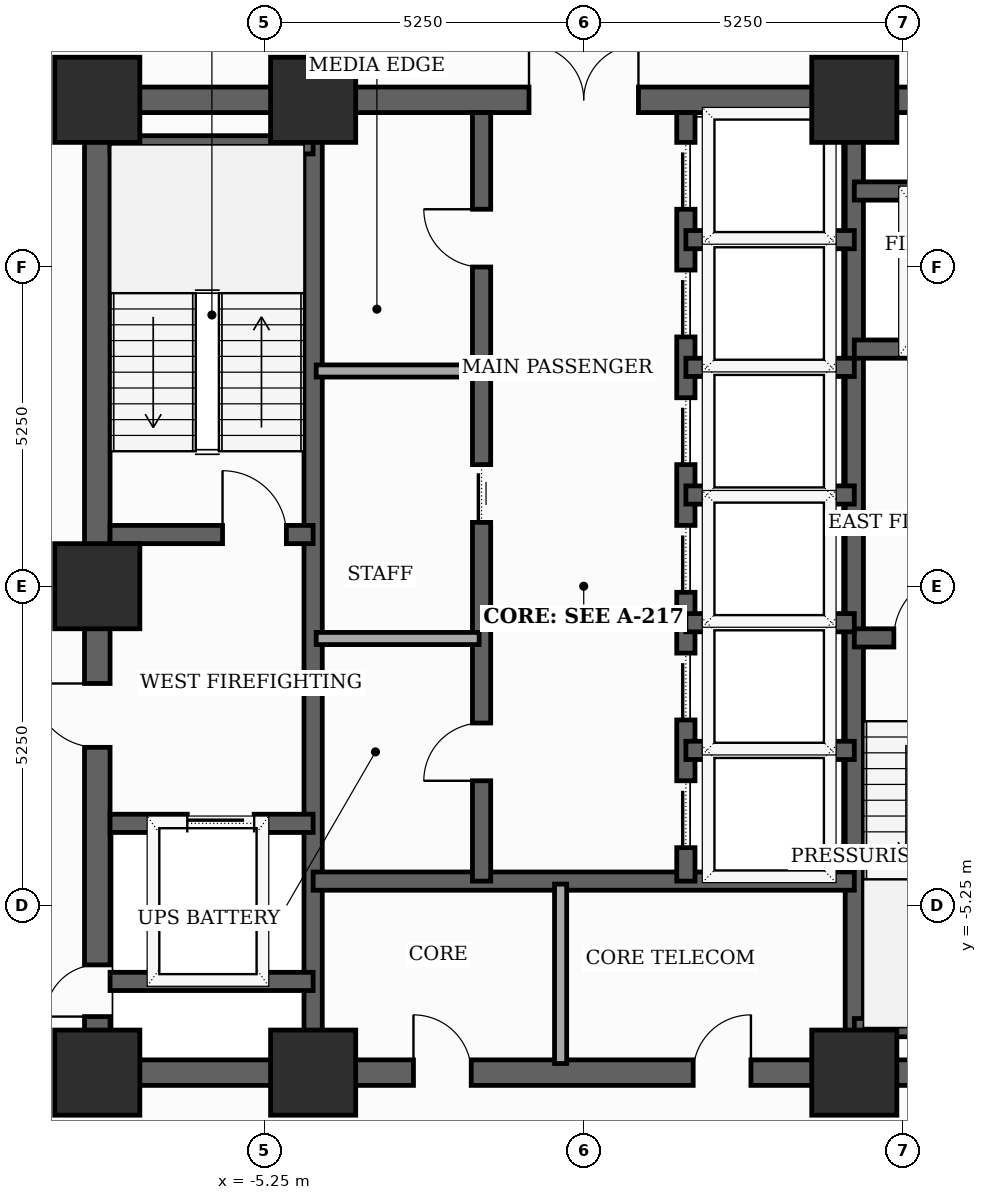
"""IFC4 building model, lengths in metres.
Left out: names, types, materials, properties, quantities, classifications, styles, units other than length and angle.
Written with IfcOpenShell. Run it as: python <this file> out.ifc"""

import sys

from ifc_helpers import new_model, si_unit, direction, frame, frame_2d, origin, origin_2d, place, context, subcontext, project, spatial, rectangle, extrude, element, fill, save


model = new_model("IFC4")
c1 = context("Model", 3, precision=1e-05, world=origin(), true_north=direction((0.0, 1.0)))
c2 = subcontext(c1, "Body", "Model", "MODEL_VIEW")
j1 = project(units=[si_unit("LENGTHUNIT", "METRE"), si_unit("PLANEANGLEUNIT", "RADIAN")], contexts=[c1])
p1 = place(None, origin())
s1 = spatial("IfcSite", under=j1, at=p1, CompositionType="ELEMENT")
p2 = place(p1, origin())
s2 = spatial("IfcBuilding", under=s1, at=p2, CompositionType="ELEMENT")
p3 = place(p2, frame((0.0, 0.0, 131.0)))
s3 = spatial("IfcBuildingStorey", under=s2, at=p3, CompositionType="ELEMENT", Elevation=131.0)
for number, where, z_axis, x_axis in (
    (1, (-8.0, -8.0, 0.0), (0.0, 0.0, 1.0), (1.0, 0.0, 0.0)),
    (2, (-4.45, -8.0, 0.0), (0.0, 0.0, 1.0), (1.0, 0.0, 0.0)),
    (3, (4.45, -8.0, 0.0), (0.0, 0.0, 1.0), (1.0, 0.0, 0.0)),
    (4, (4.45, 8.0, 0.0), (0.0, 0.0, 1.0), (1.0, 0.0, 0.0)),
    (5, (-4.45, 8.0, 0.0), (0.0, 0.0, 1.0), (1.0, 0.0, 0.0)),
    (6, (-8.0, 8.0, 0.0), (0.0, 0.0, 1.0), (1.0, 0.0, 0.0)),
    (7, (-8.0, 0.0, 0.0), (0.0, 0.0, 1.0), (1.0, 0.0, 0.0)),
):
    element("IfcColumn", number, at=place(p3, frame(where, z_axis=z_axis, x_axis=x_axis)), inside=s3, PredefinedType="COLUMN", context=c2, shape_type="SweptSolid", body=[
        extrude(rectangle(XDim=1.4, YDim=1.4, at=origin_2d()), origin(), (0.0, 0.0, 1.0), 3.7),
    ])
p4 = place(p3, frame((-8.0, -8.0, 0.0), z_axis=(0.0, 0.0, 1.0), x_axis=(0.0, 1.0, 0.0)))
e8 = element("IfcWall", 8, at=p4, inside=s3, PredefinedType="SHEAR", context=c2, shape_type="SweptSolid", body=[
    extrude(rectangle(XDim=16.0, YDim=0.42, at=frame_2d((8.0, 0.0))), origin(), (0.0, 0.0, 1.0), 3.5),
])
p5 = place(p4, frame((0.922, 0.0, 0.0)))
e9 = element("IfcOpeningElement", 9, at=p5, cuts=e8, PredefinedType="OPENING", context=c2, shape_type="SweptSolid", body=[
    extrude(rectangle(XDim=0.85, YDim=2.02, at=frame_2d((0.425, 1.01))), frame((0.0, 0.22, 0.0), z_axis=(0.0, -1.0, 0.0), x_axis=(1.0, 0.0, 0.0)), (0.0, 0.0, 1.0), 0.44),
])
p6 = place(p4, frame((5.35, 0.0, 0.0)))
e10 = element("IfcOpeningElement", 10, at=p6, cuts=e8, PredefinedType="OPENING", context=c2, shape_type="SweptSolid", body=[
    extrude(rectangle(XDim=1.05, YDim=2.15, at=frame_2d((0.525, 1.075))), frame((0.0, 0.22, 0.0), z_axis=(0.0, -1.0, 0.0), x_axis=(1.0, 0.0, 0.0)), (0.0, 0.0, 1.0), 0.44),
])
p7 = place(p3, frame((-8.0, -8.0, 0.0), z_axis=(0.0, 0.0, 1.0), x_axis=(1.0, 0.0, 0.0)))
e11 = element("IfcWall", 11, at=p7, inside=s3, PredefinedType="SHEAR", context=c2, shape_type="SweptSolid", body=[
    extrude(rectangle(XDim=16.0, YDim=0.42, at=frame_2d((8.0, 0.0))), origin(), (0.0, 0.0, 1.0), 3.5),
])
p8 = place(p7, frame((5.2, 0.0, 0.0)))
e12 = element("IfcOpeningElement", 12, at=p8, cuts=e11, PredefinedType="OPENING", context=c2, shape_type="SweptSolid", body=[
    extrude(rectangle(XDim=0.95, YDim=2.1, at=frame_2d((0.475, 1.05))), frame((0.0, 0.22, 0.0), z_axis=(0.0, -1.0, 0.0), x_axis=(1.0, 0.0, 0.0)), (0.0, 0.0, 1.0), 0.44),
])
p9 = place(p7, frame((9.8, 0.0, 0.0)))
e13 = element("IfcOpeningElement", 13, at=p9, cuts=e11, PredefinedType="OPENING", context=c2, shape_type="SweptSolid", body=[
    extrude(rectangle(XDim=0.95, YDim=2.1, at=frame_2d((0.475, 1.05))), frame((0.0, 0.22, 0.0), z_axis=(0.0, -1.0, 0.0), x_axis=(1.0, 0.0, 0.0)), (0.0, 0.0, 1.0), 0.44),
])
p10 = place(p3, frame((-8.0, 8.0, 0.0), z_axis=(0.0, 0.0, 1.0), x_axis=(1.0, 0.0, 0.0)))
e14 = element("IfcWall", 14, at=p10, inside=s3, PredefinedType="SHEAR", context=c2, shape_type="SweptSolid", body=[
    extrude(rectangle(XDim=16.0, YDim=0.42, at=frame_2d((8.0, 0.0))), origin(), (0.0, 0.0, 1.0), 3.5),
])
p11 = place(p10, frame((7.1, 0.0, 0.0)))
e15 = element("IfcOpeningElement", 15, at=p11, cuts=e14, PredefinedType="OPENING", context=c2, shape_type="SweptSolid", body=[
    extrude(rectangle(XDim=1.8, YDim=2.15, at=frame_2d((0.9, 1.075))), frame((0.0, 0.22, 0.0), z_axis=(0.0, -1.0, 0.0), x_axis=(1.0, 0.0, 0.0)), (0.0, 0.0, 1.0), 0.44),
])
for number, where, z_axis, x_axis in (
    (16, (-4.45, -7.79, 0.0), (0.0, 0.0, 1.0), (0.0, 1.0, 0.0)),
    (17, (4.45, -7.79, 0.0), (0.0, 0.0, 1.0), (0.0, 1.0, 0.0)),
):
    element("IfcWall", number, at=place(p3, frame(where, z_axis=z_axis, x_axis=x_axis)), inside=s3, PredefinedType="SHEAR", context=c2, shape_type="SweptSolid", body=[
        extrude(rectangle(XDim=15.58, YDim=0.3, at=frame_2d((7.79, 0.0))), origin(), (0.0, 0.0, 1.0), 3.5),
    ])
p12 = place(p3, frame((-7.79, 0.85, 0.0), z_axis=(0.0, 0.0, 1.0), x_axis=(1.0, 0.0, 0.0)))
e18 = element("IfcWall", 18, at=p12, inside=s3, PredefinedType="SHEAR", context=c2, shape_type="SweptSolid", body=[
    extrude(rectangle(XDim=3.34, YDim=0.3, at=frame_2d((1.67, 0.0))), origin(), (0.0, 0.0, 1.0), 3.5),
])
p13 = place(p12, frame((1.85, 0.0, 0.0)))
e19 = element("IfcOpeningElement", 19, at=p13, cuts=e18, PredefinedType="OPENING", context=c2, shape_type="SweptSolid", body=[
    extrude(rectangle(XDim=1.05, YDim=2.15, at=frame_2d((0.525, 1.075))), frame((0.0, 0.16, 0.0), z_axis=(0.0, -1.0, 0.0), x_axis=(1.0, 0.0, 0.0)), (0.0, 0.0, 1.0), 0.32),
])
p14 = place(p3, frame((-7.79, 7.26, 0.0), z_axis=(0.0, 0.0, 1.0), x_axis=(1.0, 0.0, 0.0)))
e20 = element("IfcWall", 20, at=p14, inside=s3, PredefinedType="SHEAR", context=c2, shape_type="SweptSolid", body=[
    extrude(rectangle(XDim=3.34, YDim=0.3, at=frame_2d((1.67, 0.0))), origin(), (0.0, 0.0, 1.0), 3.5),
])
p15 = place(p3, frame((4.45, -0.85, 0.0), z_axis=(0.0, 0.0, 1.0), x_axis=(1.0, 0.0, 0.0)))
e21 = element("IfcWall", 21, at=p15, inside=s3, PredefinedType="SHEAR", context=c2, shape_type="SweptSolid", body=[
    extrude(rectangle(XDim=3.34, YDim=0.3, at=frame_2d((1.67, 0.0))), origin(), (0.0, 0.0, 1.0), 3.5),
])
p16 = place(p15, frame((0.65, 0.0, 0.0)))
e22 = element("IfcOpeningElement", 22, at=p16, cuts=e21, PredefinedType="OPENING", context=c2, shape_type="SweptSolid", body=[
    extrude(rectangle(XDim=1.05, YDim=2.15, at=frame_2d((0.525, 1.075))), frame((0.0, 0.16, 0.0), z_axis=(0.0, -1.0, 0.0), x_axis=(1.0, 0.0, 0.0)), (0.0, 0.0, 1.0), 0.32),
])
p17 = place(p3, frame((4.45, -7.26, 0.0), z_axis=(0.0, 0.0, 1.0), x_axis=(1.0, 0.0, 0.0)))
e23 = element("IfcWall", 23, at=p17, inside=s3, PredefinedType="SHEAR", context=c2, shape_type="SweptSolid", body=[
    extrude(rectangle(XDim=3.55, YDim=0.3, at=frame_2d((1.775, 0.0))), origin(), (0.0, 0.0, 1.0), 3.5),
])
p18 = place(p3, frame((-7.79, -3.9, 0.0), z_axis=(0.0, 0.0, 1.0), x_axis=(1.0, 0.0, 0.0)))
e24 = element("IfcWall", 24, at=p18, inside=s3, PredefinedType="SHEAR", context=c2, shape_type="SweptSolid", body=[
    extrude(rectangle(XDim=3.34, YDim=0.3, at=frame_2d((1.67, 0.0))), origin(), (0.0, 0.0, 1.0), 3.5),
])
p19 = place(p18, frame((1.27, 0.0, 0.0)))
e25 = element("IfcOpeningElement", 25, at=p19, cuts=e24, PredefinedType="OPENING", context=c2, shape_type="SweptSolid", body=[
    extrude(rectangle(XDim=1.1, YDim=2.1, at=frame_2d((0.55, 1.05))), frame((0.0, 0.16, 0.0), z_axis=(0.0, -1.0, 0.0), x_axis=(1.0, 0.0, 0.0)), (0.0, 0.0, 1.0), 0.32),
])
p20 = place(p3, frame((-7.79, -6.5, 0.0), z_axis=(0.0, 0.0, 1.0), x_axis=(1.0, 0.0, 0.0)))
e26 = element("IfcWall", 26, at=p20, inside=s3, PredefinedType="SHEAR", context=c2, shape_type="SweptSolid", body=[
    extrude(rectangle(XDim=3.34, YDim=0.3, at=frame_2d((1.67, 0.0))), origin(), (0.0, 0.0, 1.0), 3.5),
])
p21 = place(p3, frame((4.45, 3.9, 0.0), z_axis=(0.0, 0.0, 1.0), x_axis=(1.0, 0.0, 0.0)))
e27 = element("IfcWall", 27, at=p21, inside=s3, PredefinedType="SHEAR", context=c2, shape_type="SweptSolid", body=[
    extrude(rectangle(XDim=3.34, YDim=0.3, at=frame_2d((1.67, 0.0))), origin(), (0.0, 0.0, 1.0), 3.5),
])
p22 = place(p21, frame((1.18, 0.0, 0.0)))
e28 = element("IfcOpeningElement", 28, at=p22, cuts=e27, PredefinedType="OPENING", context=c2, shape_type="SweptSolid", body=[
    extrude(rectangle(XDim=1.1, YDim=2.1, at=frame_2d((0.55, 1.05))), frame((0.0, 0.16, 0.0), z_axis=(0.0, -1.0, 0.0), x_axis=(1.0, 0.0, 0.0)), (0.0, 0.0, 1.0), 0.32),
])
p23 = place(p3, frame((4.45, 6.5, 0.0), z_axis=(0.0, 0.0, 1.0), x_axis=(1.0, 0.0, 0.0)))
e29 = element("IfcWall", 29, at=p23, inside=s3, PredefinedType="SHEAR", context=c2, shape_type="SweptSolid", body=[
    extrude(rectangle(XDim=3.34, YDim=0.3, at=frame_2d((1.67, 0.0))), origin(), (0.0, 0.0, 1.0), 3.5),
])
p24 = place(p3, frame((-4.45, -4.85, 0.0), z_axis=(0.0, 0.0, 1.0), x_axis=(1.0, 0.0, 0.0)))
e30 = element("IfcWall", 30, at=p24, inside=s3, PredefinedType="SHEAR", context=c2, shape_type="SweptSolid", body=[
    extrude(rectangle(XDim=8.9, YDim=0.3, at=frame_2d((4.45, 0.0))), origin(), (0.0, 0.0, 1.0), 3.5),
])
p25 = place(p3, frame((-1.68, -4.85, 0.0), z_axis=(0.0, 0.0, 1.0), x_axis=(0.0, 1.0, 0.0)))
e31 = element("IfcWall", 31, at=p25, inside=s3, PredefinedType="SHEAR", context=c2, shape_type="SweptSolid", body=[
    extrude(rectangle(XDim=12.64, YDim=0.3, at=frame_2d((6.32, 0.0))), origin(), (0.0, 0.0, 1.0), 3.5),
])
p26 = place(p25, frame((1.65, 0.0, 0.0)))
e32 = element("IfcOpeningElement", 32, at=p26, cuts=e31, PredefinedType="OPENING", context=c2, shape_type="SweptSolid", body=[
    extrude(rectangle(XDim=0.95, YDim=2.1, at=frame_2d((0.475, 1.05))), frame((0.0, 0.16, 0.0), z_axis=(0.0, -1.0, 0.0), x_axis=(1.0, 0.0, 0.0)), (0.0, 0.0, 1.0), 0.32),
])
p27 = place(p25, frame((5.9, 0.0, 0.0)))
e33 = element("IfcOpeningElement", 33, at=p27, cuts=e31, PredefinedType="OPENING", context=c2, shape_type="SweptSolid", body=[
    extrude(rectangle(XDim=0.95, YDim=2.1, at=frame_2d((0.475, 1.05))), frame((0.0, 0.16, 0.0), z_axis=(0.0, -1.0, 0.0), x_axis=(1.0, 0.0, 0.0)), (0.0, 0.0, 1.0), 0.32),
])
p28 = place(p25, frame((10.1, 0.0, 0.0)))
e34 = element("IfcOpeningElement", 34, at=p28, cuts=e31, PredefinedType="OPENING", context=c2, shape_type="SweptSolid", body=[
    extrude(rectangle(XDim=0.95, YDim=2.1, at=frame_2d((0.475, 1.05))), frame((0.0, 0.16, 0.0), z_axis=(0.0, -1.0, 0.0), x_axis=(1.0, 0.0, 0.0)), (0.0, 0.0, 1.0), 0.32),
])
p29 = place(p3, frame((1.68, -4.85, 0.0), z_axis=(0.0, 0.0, 1.0), x_axis=(0.0, 1.0, 0.0)))
e35 = element("IfcWall", 35, at=p29, inside=s3, PredefinedType="SHEAR", context=c2, shape_type="SweptSolid", body=[
    extrude(rectangle(XDim=12.64, YDim=0.3, at=frame_2d((6.32, 0.0))), origin(), (0.0, 0.0, 1.0), 3.5),
])
p30 = place(p29, frame((0.55, 0.0, 0.0)))
e36 = element("IfcOpeningElement", 36, at=p30, cuts=e35, PredefinedType="OPENING", context=c2, shape_type="SweptSolid", body=[
    extrude(rectangle(XDim=1.1, YDim=2.1, at=frame_2d((0.55, 1.05))), frame((0.0, 0.16, 0.0), z_axis=(0.0, -1.0, 0.0), x_axis=(1.0, 0.0, 0.0)), (0.0, 0.0, 1.0), 0.32),
])
p31 = place(p29, frame((2.65, 0.0, 0.0)))
e37 = element("IfcOpeningElement", 37, at=p31, cuts=e35, PredefinedType="OPENING", context=c2, shape_type="SweptSolid", body=[
    extrude(rectangle(XDim=1.1, YDim=2.1, at=frame_2d((0.55, 1.05))), frame((0.0, 0.16, 0.0), z_axis=(0.0, -1.0, 0.0), x_axis=(1.0, 0.0, 0.0)), (0.0, 0.0, 1.0), 0.32),
])
p32 = place(p29, frame((4.75, 0.0, 0.0)))
e38 = element("IfcOpeningElement", 38, at=p32, cuts=e35, PredefinedType="OPENING", context=c2, shape_type="SweptSolid", body=[
    extrude(rectangle(XDim=1.1, YDim=2.1, at=frame_2d((0.55, 1.05))), frame((0.0, 0.16, 0.0), z_axis=(0.0, -1.0, 0.0), x_axis=(1.0, 0.0, 0.0)), (0.0, 0.0, 1.0), 0.32),
])
p33 = place(p29, frame((6.85, 0.0, 0.0)))
e39 = element("IfcOpeningElement", 39, at=p33, cuts=e35, PredefinedType="OPENING", context=c2, shape_type="SweptSolid", body=[
    extrude(rectangle(XDim=1.1, YDim=2.1, at=frame_2d((0.55, 1.05))), frame((0.0, 0.16, 0.0), z_axis=(0.0, -1.0, 0.0), x_axis=(1.0, 0.0, 0.0)), (0.0, 0.0, 1.0), 0.32),
])
p34 = place(p29, frame((8.95, 0.0, 0.0)))
e40 = element("IfcOpeningElement", 40, at=p34, cuts=e35, PredefinedType="OPENING", context=c2, shape_type="SweptSolid", body=[
    extrude(rectangle(XDim=1.1, YDim=2.1, at=frame_2d((0.55, 1.05))), frame((0.0, 0.16, 0.0), z_axis=(0.0, -1.0, 0.0), x_axis=(1.0, 0.0, 0.0)), (0.0, 0.0, 1.0), 0.32),
])
p35 = place(p29, frame((11.05, 0.0, 0.0)))
e41 = element("IfcOpeningElement", 41, at=p35, cuts=e35, PredefinedType="OPENING", context=c2, shape_type="SweptSolid", body=[
    extrude(rectangle(XDim=1.1, YDim=2.1, at=frame_2d((0.55, 1.05))), frame((0.0, 0.16, 0.0), z_axis=(0.0, -1.0, 0.0), x_axis=(1.0, 0.0, 0.0)), (0.0, 0.0, 1.0), 0.32),
])
for number, where, z_axis, x_axis in (
    (42, (1.68, 1.5, 0.0), (0.0, 0.0, 1.0), (1.0, 0.0, 0.0)),
    (43, (1.68, 3.6, 0.0), (0.0, 0.0, 1.0), (1.0, 0.0, 0.0)),
    (44, (1.68, 5.7, 0.0), (0.0, 0.0, 1.0), (1.0, 0.0, 0.0)),
    (45, (1.68, -2.7, 0.0), (0.0, 0.0, 1.0), (1.0, 0.0, 0.0)),
    (46, (1.68, -0.6, 0.0), (0.0, 0.0, 1.0), (1.0, 0.0, 0.0)),
):
    element("IfcWall", number, at=place(p3, frame(where, z_axis=z_axis, x_axis=x_axis)), inside=s3, PredefinedType="SHEAR", context=c2, shape_type="SweptSolid", body=[
        extrude(rectangle(XDim=2.77, YDim=0.3, at=frame_2d((1.385, 0.0))), origin(), (0.0, 0.0, 1.0), 3.5),
    ])
p36 = place(p3, frame((-0.38, -7.85, 0.0), z_axis=(0.0, 0.0, 1.0), x_axis=(0.0, 1.0, 0.0)))
e47 = element("IfcWall", 47, at=p36, inside=s3, PredefinedType="SOLIDWALL", context=c2, shape_type="SweptSolid", body=[
    extrude(rectangle(XDim=2.95, YDim=0.2, at=frame_2d((1.475, 0.0))), origin(), (0.0, 0.0, 1.0), 2.885),
])
for number, where, z_axis, x_axis in (
    (48, (-4.4, -0.86, 0.0), (0.0, 0.0, 1.0), (1.0, 0.0, 0.0)),
    (49, (-4.4, 3.54, 0.0), (0.0, 0.0, 1.0), (1.0, 0.0, 0.0)),
):
    element("IfcWall", number, at=place(p3, frame(where, z_axis=z_axis, x_axis=x_axis)), inside=s3, PredefinedType="SOLIDWALL", context=c2, shape_type="SweptSolid", body=[
        extrude(rectangle(XDim=2.68, YDim=0.2, at=frame_2d((1.34, 0.0))), origin(), (0.0, 0.0, 1.0), 3.5),
    ])
p37 = place(p5, origin())
e50 = element("IfcDoor", 50, at=p37, inside=s3, OperationType="SINGLE_SWING_LEFT", PredefinedType="TRAPDOOR", context=c2, shape_type="SweptSolid", body=[
    extrude(rectangle(XDim=0.85, YDim=2.02, at=frame_2d((0.425, 1.01))), frame((0.0, 0.025, 0.0), z_axis=(0.0, -1.0, 0.0), x_axis=(1.0, 0.0, 0.0)), (0.0, 0.0, 1.0), 0.05),
])
fill(e9, e50)
p38 = place(p6, origin())
e51 = element("IfcDoor", 51, at=p38, inside=s3, OperationType="SINGLE_SWING_RIGHT", PredefinedType="DOOR", context=c2, shape_type="SweptSolid", body=[
    extrude(rectangle(XDim=1.05, YDim=2.15, at=frame_2d((0.525, 1.075))), frame((0.0, 0.025, 0.0), z_axis=(0.0, -1.0, 0.0), x_axis=(1.0, 0.0, 0.0)), (0.0, 0.0, 1.0), 0.05),
])
fill(e10, e51)
p39 = place(p8, origin())
e52 = element("IfcDoor", 52, at=p39, inside=s3, OperationType="SINGLE_SWING_LEFT", PredefinedType="DOOR", context=c2, shape_type="SweptSolid", body=[
    extrude(rectangle(XDim=0.95, YDim=2.1, at=frame_2d((0.475, 1.05))), frame((0.0, 0.025, 0.0), z_axis=(0.0, -1.0, 0.0), x_axis=(1.0, 0.0, 0.0)), (0.0, 0.0, 1.0), 0.05),
])
fill(e12, e52)
p40 = place(p9, origin())
e53 = element("IfcDoor", 53, at=p40, inside=s3, OperationType="SINGLE_SWING_RIGHT", PredefinedType="DOOR", context=c2, shape_type="SweptSolid", body=[
    extrude(rectangle(XDim=0.95, YDim=2.1, at=frame_2d((0.475, 1.05))), frame((0.0, 0.025, 0.0), z_axis=(0.0, -1.0, 0.0), x_axis=(1.0, 0.0, 0.0)), (0.0, 0.0, 1.0), 0.05),
])
fill(e13, e53)
p41 = place(p11, origin())
e54 = element("IfcDoor", 54, at=p41, inside=s3, OperationType="DOUBLE_DOOR_SINGLE_SWING", PredefinedType="DOOR", context=c2, shape_type="SweptSolid", body=[
    extrude(rectangle(XDim=1.8, YDim=2.15, at=frame_2d((0.9, 1.075))), frame((0.0, 0.025, 0.0), z_axis=(0.0, -1.0, 0.0), x_axis=(1.0, 0.0, 0.0)), (0.0, 0.0, 1.0), 0.05),
])
fill(e15, e54)
p42 = place(p13, origin())
e55 = element("IfcDoor", 55, at=p42, inside=s3, OperationType="SINGLE_SWING_LEFT", PredefinedType="DOOR", context=c2, shape_type="SweptSolid", body=[
    extrude(rectangle(XDim=1.05, YDim=2.15, at=frame_2d((0.525, 1.075))), frame((0.0, 0.025, 0.0), z_axis=(0.0, -1.0, 0.0), x_axis=(1.0, 0.0, 0.0)), (0.0, 0.0, 1.0), 0.05),
])
fill(e19, e55)
p43 = place(p16, origin())
e56 = element("IfcDoor", 56, at=p43, inside=s3, OperationType="SINGLE_SWING_RIGHT", PredefinedType="DOOR", context=c2, shape_type="SweptSolid", body=[
    extrude(rectangle(XDim=1.05, YDim=2.15, at=frame_2d((0.525, 1.075))), frame((0.0, 0.025, 0.0), z_axis=(0.0, -1.0, 0.0), x_axis=(1.0, 0.0, 0.0)), (0.0, 0.0, 1.0), 0.05),
])
fill(e22, e56)
p44 = place(p19, origin())
e57 = element("IfcDoor", 57, at=p44, inside=s3, OperationType="SLIDING_TO_LEFT", PredefinedType="DOOR", context=c2, shape_type="SweptSolid", body=[
    extrude(rectangle(XDim=1.1, YDim=2.1, at=frame_2d((0.55, 1.05))), frame((0.0, 0.025, 0.0), z_axis=(0.0, -1.0, 0.0), x_axis=(1.0, 0.0, 0.0)), (0.0, 0.0, 1.0), 0.05),
])
fill(e25, e57)
p45 = place(p26, origin())
e58 = element("IfcDoor", 58, at=p45, inside=s3, OperationType="SINGLE_SWING_LEFT", PredefinedType="DOOR", context=c2, shape_type="SweptSolid", body=[
    extrude(rectangle(XDim=0.95, YDim=2.1, at=frame_2d((0.475, 1.05))), frame((0.0, 0.025, 0.0), z_axis=(0.0, -1.0, 0.0), x_axis=(1.0, 0.0, 0.0)), (0.0, 0.0, 1.0), 0.05),
])
fill(e32, e58)
p46 = place(p27, origin())
e59 = element("IfcDoor", 59, at=p46, inside=s3, OperationType="SLIDING_TO_LEFT", PredefinedType="DOOR", context=c2, shape_type="SweptSolid", body=[
    extrude(rectangle(XDim=0.95, YDim=2.1, at=frame_2d((0.475, 1.05))), frame((0.0, 0.025, 0.0), z_axis=(0.0, -1.0, 0.0), x_axis=(1.0, 0.0, 0.0)), (0.0, 0.0, 1.0), 0.05),
])
fill(e33, e59)
p47 = place(p28, origin())
e60 = element("IfcDoor", 60, at=p47, inside=s3, OperationType="SINGLE_SWING_RIGHT", PredefinedType="DOOR", context=c2, shape_type="SweptSolid", body=[
    extrude(rectangle(XDim=0.95, YDim=2.1, at=frame_2d((0.475, 1.05))), frame((0.0, 0.025, 0.0), z_axis=(0.0, -1.0, 0.0), x_axis=(1.0, 0.0, 0.0)), (0.0, 0.0, 1.0), 0.05),
])
fill(e34, e60)
p48 = place(p30, origin())
e61 = element("IfcDoor", 61, at=p48, inside=s3, OperationType="SLIDING_TO_LEFT", PredefinedType="DOOR", context=c2, shape_type="SweptSolid", body=[
    extrude(rectangle(XDim=1.1, YDim=2.1, at=frame_2d((0.55, 1.05))), frame((0.0, 0.025, 0.0), z_axis=(0.0, -1.0, 0.0), x_axis=(1.0, 0.0, 0.0)), (0.0, 0.0, 1.0), 0.05),
])
fill(e36, e61)
p49 = place(p31, origin())
e62 = element("IfcDoor", 62, at=p49, inside=s3, OperationType="SLIDING_TO_LEFT", PredefinedType="DOOR", context=c2, shape_type="SweptSolid", body=[
    extrude(rectangle(XDim=1.1, YDim=2.1, at=frame_2d((0.55, 1.05))), frame((0.0, 0.025, 0.0), z_axis=(0.0, -1.0, 0.0), x_axis=(1.0, 0.0, 0.0)), (0.0, 0.0, 1.0), 0.05),
])
fill(e37, e62)
p50 = place(p32, origin())
e63 = element("IfcDoor", 63, at=p50, inside=s3, OperationType="SLIDING_TO_LEFT", PredefinedType="DOOR", context=c2, shape_type="SweptSolid", body=[
    extrude(rectangle(XDim=1.1, YDim=2.1, at=frame_2d((0.55, 1.05))), frame((0.0, 0.025, 0.0), z_axis=(0.0, -1.0, 0.0), x_axis=(1.0, 0.0, 0.0)), (0.0, 0.0, 1.0), 0.05),
])
fill(e38, e63)
p51 = place(p33, origin())
e64 = element("IfcDoor", 64, at=p51, inside=s3, OperationType="SLIDING_TO_LEFT", PredefinedType="DOOR", context=c2, shape_type="SweptSolid", body=[
    extrude(rectangle(XDim=1.1, YDim=2.1, at=frame_2d((0.55, 1.05))), frame((0.0, 0.025, 0.0), z_axis=(0.0, -1.0, 0.0), x_axis=(1.0, 0.0, 0.0)), (0.0, 0.0, 1.0), 0.05),
])
fill(e39, e64)
p52 = place(p34, origin())
e65 = element("IfcDoor", 65, at=p52, inside=s3, OperationType="SLIDING_TO_LEFT", PredefinedType="DOOR", context=c2, shape_type="SweptSolid", body=[
    extrude(rectangle(XDim=1.1, YDim=2.1, at=frame_2d((0.55, 1.05))), frame((0.0, 0.025, 0.0), z_axis=(0.0, -1.0, 0.0), x_axis=(1.0, 0.0, 0.0)), (0.0, 0.0, 1.0), 0.05),
])
fill(e40, e65)
p53 = place(p35, origin())
e66 = element("IfcDoor", 66, at=p53, inside=s3, OperationType="SLIDING_TO_LEFT", PredefinedType="DOOR", context=c2, shape_type="SweptSolid", body=[
    extrude(rectangle(XDim=1.1, YDim=2.1, at=frame_2d((0.55, 1.05))), frame((0.0, 0.025, 0.0), z_axis=(0.0, -1.0, 0.0), x_axis=(1.0, 0.0, 0.0)), (0.0, 0.0, 1.0), 0.05),
])
fill(e41, e66)
save(model, sys.argv[1])
